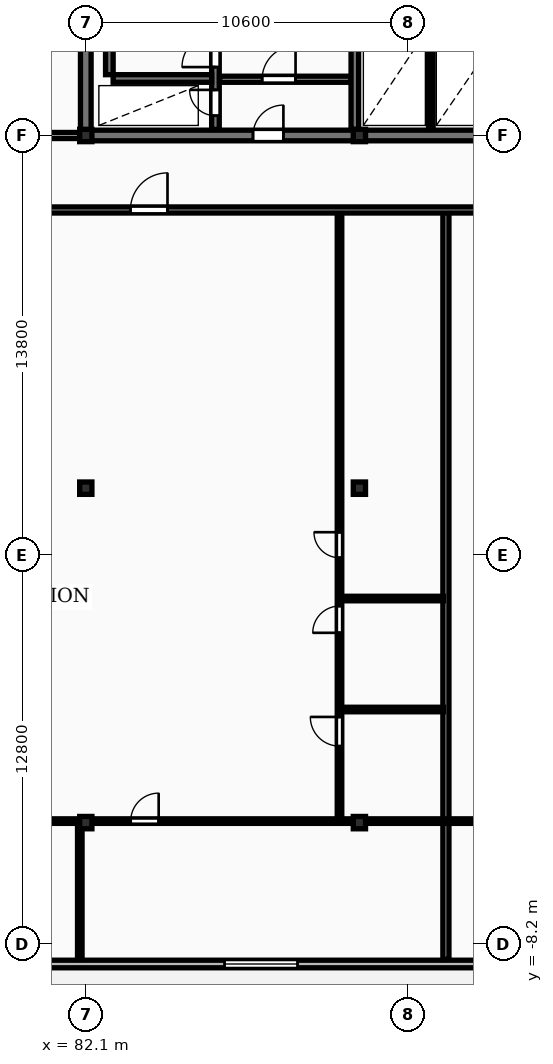
"""IFC4 building model, lengths in metres.
Left out: names, types, materials, properties, quantities, classifications, styles, units other than length and angle.
Written with IfcOpenShell. Run it as: python <this file> out.ifc"""

import sys

from ifc_helpers import new_model, si_unit, direction, frame, frame_2d, origin, origin_2d, place, context, subcontext, project, spatial, rectangle, i_section, extrude, element, fill, save


model = new_model("IFC4")
c1 = context("Model", 3, precision=1e-05, world=origin(), true_north=direction((0.0, 1.0)))
c2 = subcontext(c1, "Body", "Model", "MODEL_VIEW")
j1 = project(units=[si_unit("LENGTHUNIT", "METRE"), si_unit("PLANEANGLEUNIT", "RADIAN")], contexts=[c1])
p1 = place(None, origin())
s1 = spatial("IfcSite", under=j1, at=p1, CompositionType="ELEMENT")
p2 = place(p1, origin())
s2 = spatial("IfcBuilding", under=s1, at=p2, CompositionType="ELEMENT")
p3 = place(p2, frame((0.0, 0.0, 150.1)))
s3 = spatial("IfcBuildingStorey", under=s2, at=p3, CompositionType="ELEMENT", Elevation=150.1)
for number, where, z_axis, x_axis in (
    (1, (82.1, -4.2, 0.0), (0.0, 0.0, 1.0), (1.0, 0.0, 0.0)),
    (2, (82.1, 6.8, 0.0), (0.0, 0.0, 1.0), (1.0, 0.0, 0.0)),
    (3, (82.1, 18.4, 0.0), (0.0, 0.0, 1.0), (1.0, 0.0, 0.0)),
    (4, (91.1, -4.2, 0.0), (0.0, 0.0, 1.0), (1.0, 0.0, 0.0)),
    (5, (91.1, 6.8, 0.0), (0.0, 0.0, 1.0), (1.0, 0.0, 0.0)),
    (6, (91.1, 18.4, 0.0), (0.0, 0.0, 1.0), (1.0, 0.0, 0.0)),
):
    element("IfcColumn", number, at=place(p3, frame(where, z_axis=z_axis, x_axis=x_axis)), inside=s3, PredefinedType="COLUMN", context=c2, shape_type="SweptSolid", body=[
        extrude(i_section(OverallWidth=0.403, OverallDepth=0.406, WebThickness=0.027, FlangeThickness=0.043, FilletRadius=0.015, at=origin_2d()), origin(), (0.0, 0.0, 1.0), 3.6),
    ])
p4 = place(p3, frame((72.7, -8.85, 0.0), z_axis=(0.0, 0.0, 1.0), x_axis=(1.0, 0.0, 0.0)))
e7 = element("IfcWall", 7, at=p4, inside=s3, PredefinedType="STANDARD", context=c2, shape_type="SweptSolid", body=[
    extrude(rectangle(XDim=58.0, YDim=0.25, at=frame_2d((29.0, 0.0))), origin(), (0.0, 0.0, 1.0), 3.31),
])
p5 = place(p4, frame((3.761, 0.0, 0.0)))
e8 = element("IfcOpeningElement", 8, at=p5, cuts=e7, PredefinedType="OPENING", context=c2, shape_type="SweptSolid", body=[
    extrude(rectangle(XDim=1.8, YDim=2.2, at=frame_2d((0.9, 1.1))), frame((0.0, 0.135, 0.0), z_axis=(0.0, -1.0, 0.0), x_axis=(1.0, 0.0, 0.0)), (0.0, 0.0, 1.0), 0.27),
])
p6 = place(p4, frame((13.964, 0.0, 0.85)))
e9 = element("IfcOpeningElement", 9, at=p6, cuts=e7, PredefinedType="OPENING", context=c2, shape_type="SweptSolid", body=[
    extrude(rectangle(XDim=2.4, YDim=1.9, at=frame_2d((1.2, 0.95))), frame((0.0, 0.135, 0.0), z_axis=(0.0, -1.0, 0.0), x_axis=(1.0, 0.0, 0.0)), (0.0, 0.0, 1.0), 0.27),
])
p7 = place(p4, frame((25.138, 0.0, 0.0)))
e10 = element("IfcOpeningElement", 10, at=p7, cuts=e7, PredefinedType="OPENING", context=c2, shape_type="SweptSolid", body=[
    extrude(rectangle(XDim=1.8, YDim=2.2, at=frame_2d((0.9, 1.1))), frame((0.0, 0.135, 0.0), z_axis=(0.0, -1.0, 0.0), x_axis=(1.0, 0.0, 0.0)), (0.0, 0.0, 1.0), 0.27),
])
p8 = place(p4, frame((35.489, 0.0, 0.85)))
e11 = element("IfcOpeningElement", 11, at=p8, cuts=e7, PredefinedType="OPENING", context=c2, shape_type="SweptSolid", body=[
    extrude(rectangle(XDim=2.4, YDim=1.9, at=frame_2d((1.2, 0.95))), frame((0.0, 0.135, 0.0), z_axis=(0.0, -1.0, 0.0), x_axis=(1.0, 0.0, 0.0)), (0.0, 0.0, 1.0), 0.27),
])
p9 = place(p4, frame((47.713, 0.0, 0.0)))
e12 = element("IfcOpeningElement", 12, at=p9, cuts=e7, PredefinedType="OPENING", context=c2, shape_type="SweptSolid", body=[
    extrude(rectangle(XDim=1.8, YDim=2.2, at=frame_2d((0.9, 1.1))), frame((0.0, 0.135, 0.0), z_axis=(0.0, -1.0, 0.0), x_axis=(1.0, 0.0, 0.0)), (0.0, 0.0, 1.0), 0.27),
])
p10 = place(p4, frame((54.9, 0.0, 0.85)))
e13 = element("IfcOpeningElement", 13, at=p10, cuts=e7, PredefinedType="OPENING", context=c2, shape_type="SweptSolid", body=[
    extrude(rectangle(XDim=2.4, YDim=1.9, at=frame_2d((1.2, 0.95))), frame((0.0, 0.135, 0.0), z_axis=(0.0, -1.0, 0.0), x_axis=(1.0, 0.0, 0.0)), (0.0, 0.0, 1.0), 0.27),
])
p11 = place(p3, frame((82.1, 18.575, 0.0), z_axis=(0.0, 0.0, 1.0), x_axis=(0.0, 1.0, 0.0)))
e14 = element("IfcWall", 14, at=p11, inside=s3, PredefinedType="SHEAR", context=c2, shape_type="SweptSolid", body=[
    extrude(rectangle(XDim=11.65, YDim=0.35, at=frame_2d((5.825, 0.0))), origin(), (0.0, 0.0, 1.0), 3.6),
])
p12 = place(p3, frame((81.925, 18.4, 0.0), z_axis=(0.0, 0.0, 1.0), x_axis=(1.0, 0.0, 0.0)))
e15 = element("IfcWall", 15, at=p12, inside=s3, PredefinedType="SHEAR", context=c2, shape_type="SweptSolid", body=[
    extrude(rectangle(XDim=36.265, YDim=0.35, at=frame_2d((18.132, 0.0))), origin(), (0.0, 0.0, 1.0), 3.6),
])
p13 = place(p12, frame((5.675, 0.0, 0.0)))
e16 = element("IfcOpeningElement", 16, at=p13, cuts=e15, PredefinedType="OPENING", context=c2, shape_type="SweptSolid", body=[
    extrude(rectangle(XDim=1.0, YDim=2.15, at=frame_2d((0.5, 1.075))), frame((0.0, 0.185, 0.0), z_axis=(0.0, -1.0, 0.0), x_axis=(1.0, 0.0, 0.0)), (0.0, 0.0, 1.0), 0.37),
])
p14 = place(p12, frame((21.925, 0.0, 0.0)))
e17 = element("IfcOpeningElement", 17, at=p14, cuts=e15, PredefinedType="OPENING", context=c2, shape_type="SweptSolid", body=[
    extrude(rectangle(XDim=1.5, YDim=2.2, at=frame_2d((0.75, 1.1))), frame((0.0, 0.185, 0.0), z_axis=(0.0, -1.0, 0.0), x_axis=(1.0, 0.0, 0.0)), (0.0, 0.0, 1.0), 0.37),
])
p15 = place(p12, frame((29.875, 0.0, 0.0)))
e18 = element("IfcOpeningElement", 18, at=p15, cuts=e15, PredefinedType="OPENING", context=c2, shape_type="SweptSolid", body=[
    extrude(rectangle(XDim=1.0, YDim=2.15, at=frame_2d((0.5, 1.075))), frame((0.0, 0.185, 0.0), z_axis=(0.0, -1.0, 0.0), x_axis=(1.0, 0.0, 0.0)), (0.0, 0.0, 1.0), 0.37),
])
p16 = place(p3, frame((82.875, 20.4, 0.0), z_axis=(0.0, 0.0, 1.0), x_axis=(0.0, 1.0, 0.0)))
e19 = element("IfcWall", 19, at=p16, inside=s3, PredefinedType="SHEAR", context=c2, shape_type="SweptSolid", body=[
    extrude(rectangle(XDim=7.6, YDim=0.25, at=frame_2d((3.8, 0.0))), origin(), (0.0, 0.0, 1.0), 3.6),
])
p17 = place(p3, frame((86.365, 18.6, 0.0), z_axis=(0.0, 0.0, 1.0), x_axis=(0.0, 1.0, 0.0)))
e20 = element("IfcWall", 20, at=p17, inside=s3, PredefinedType="SHEAR", context=c2, shape_type="SweptSolid", body=[
    extrude(rectangle(XDim=11.6, YDim=0.25, at=frame_2d((5.8, 0.0))), origin(), (0.0, 0.0, 1.0), 3.6),
])
p18 = place(p17, frame((0.45, 0.0, 0.0)))
e21 = element("IfcOpeningElement", 21, at=p18, cuts=e20, PredefinedType="OPENING", context=c2, shape_type="SweptSolid", body=[
    extrude(rectangle(XDim=0.85, YDim=2.05, at=frame_2d((0.425, 1.025))), frame((0.0, 0.135, 0.0), z_axis=(0.0, -1.0, 0.0), x_axis=(1.0, 0.0, 0.0)), (0.0, 0.0, 1.0), 0.27),
])
p19 = place(p17, frame((2.05, 0.0, 0.0)))
e22 = element("IfcOpeningElement", 22, at=p19, cuts=e20, PredefinedType="OPENING", context=c2, shape_type="SweptSolid", body=[
    extrude(rectangle(XDim=1.1, YDim=2.1, at=frame_2d((0.55, 1.05))), frame((0.0, 0.135, 0.0), z_axis=(0.0, -1.0, 0.0), x_axis=(1.0, 0.0, 0.0)), (0.0, 0.0, 1.0), 0.27),
])
p20 = place(p17, frame((9.95, 0.0, 0.0)))
e23 = element("IfcOpeningElement", 23, at=p20, cuts=e20, PredefinedType="OPENING", context=c2, shape_type="SweptSolid", body=[
    extrude(rectangle(XDim=0.85, YDim=2.05, at=frame_2d((0.425, 1.025))), frame((0.0, 0.135, 0.0), z_axis=(0.0, -1.0, 0.0), x_axis=(1.0, 0.0, 0.0)), (0.0, 0.0, 1.0), 0.27),
])
p21 = place(p3, frame((83.0, 20.275, 0.0), z_axis=(0.0, 0.0, 1.0), x_axis=(1.0, 0.0, 0.0)))
e24 = element("IfcWall", 24, at=p21, inside=s3, PredefinedType="SHEAR", context=c2, shape_type="SweptSolid", body=[
    extrude(rectangle(XDim=3.24, YDim=0.25, at=frame_2d((1.62, 0.0))), origin(), (0.0, 0.0, 1.0), 3.6),
])
p22 = place(p3, frame((86.5, 20.25, 0.0), z_axis=(0.0, 0.0, 1.0), x_axis=(1.0, 0.0, 0.0)))
e25 = element("IfcWall", 25, at=p22, inside=s3, PredefinedType="PARTITIONING", context=c2, shape_type="SweptSolid", body=[
    extrude(rectangle(XDim=4.32, YDim=0.2, at=frame_2d((2.16, 0.0))), origin(), (0.0, 0.0, 1.0), 3.31),
])
p23 = place(p22, frame((1.4, 0.0, 0.0)))
e26 = element("IfcOpeningElement", 26, at=p23, cuts=e25, PredefinedType="OPENING", context=c2, shape_type="SweptSolid", body=[
    extrude(rectangle(XDim=1.1, YDim=2.1, at=frame_2d((0.55, 1.05))), frame((0.0, 0.11, 0.0), z_axis=(0.0, -1.0, 0.0), x_axis=(1.0, 0.0, 0.0)), (0.0, 0.0, 1.0), 0.22),
])
p24 = place(p3, frame((90.95, 18.6, 0.0), z_axis=(0.0, 0.0, 1.0), x_axis=(0.0, 1.0, 0.0)))
e27 = element("IfcWall", 27, at=p24, inside=s3, PredefinedType="SHEAR", context=c2, shape_type="SweptSolid", body=[
    extrude(rectangle(XDim=11.6, YDim=0.25, at=frame_2d((5.8, 0.0))), origin(), (0.0, 0.0, 1.0), 3.6),
])
p25 = place(p24, frame((4.6, 0.0, 0.0)))
e28 = element("IfcOpeningElement", 28, at=p25, cuts=e27, PredefinedType="OPENING", context=c2, shape_type="SweptSolid", body=[
    extrude(rectangle(XDim=1.1, YDim=2.1, at=frame_2d((0.55, 1.05))), frame((0.0, 0.135, 0.0), z_axis=(0.0, -1.0, 0.0), x_axis=(1.0, 0.0, 0.0)), (0.0, 0.0, 1.0), 0.27),
])
p26 = place(p3, frame((93.45, 18.6, 0.0), z_axis=(0.0, 0.0, 1.0), x_axis=(0.0, 1.0, 0.0)))
e29 = element("IfcWall", 29, at=p26, inside=s3, PredefinedType="PARTITIONING", context=c2, shape_type="SweptSolid", body=[
    extrude(rectangle(XDim=3.6, YDim=0.15, at=frame_2d((1.8, 0.0))), origin(), (0.0, 0.0, 1.0), 3.31),
])
p27 = place(p3, frame((72.7, 18.4, 0.0), z_axis=(0.0, 0.0, 1.0), x_axis=(1.0, 0.0, 0.0)))
e30 = element("IfcWall", 30, at=p27, inside=s3, PredefinedType="PARTITIONING", context=c2, shape_type="SweptSolid", body=[
    extrude(rectangle(XDim=9.25, YDim=0.2, at=frame_2d((4.625, 0.0))), origin(), (0.0, 0.0, 1.0), 2.698),
])
p28 = place(p27, frame((4.15, 0.0, 0.0)))
e31 = element("IfcOpeningElement", 31, at=p28, cuts=e30, PredefinedType="OPENING", context=c2, shape_type="SweptSolid", body=[
    extrude(rectangle(XDim=0.95, YDim=2.15, at=frame_2d((0.475, 1.075))), frame((0.0, 0.11, 0.0), z_axis=(0.0, -1.0, 0.0), x_axis=(1.0, 0.0, 0.0)), (0.0, 0.0, 1.0), 0.22),
])
p29 = place(p3, frame((93.946, -8.7, 0.0), z_axis=(0.0, 0.0, 1.0), x_axis=(0.0, 1.0, 0.0)))
e32 = element("IfcWall", 32, at=p29, inside=s3, PredefinedType="PARTITIONING", context=c2, shape_type="SweptSolid", body=[
    extrude(rectangle(XDim=24.57, YDim=0.2, at=frame_2d((12.285, 0.0))), origin(), (0.0, 0.0, 1.0), 3.31),
])
for number, where, z_axis, x_axis in (
    (33, (90.506, -0.48, 0.0), (0.0, 0.0, 1.0), (1.0, 0.0, 0.0)),
    (34, (90.506, 3.17, 0.0), (0.0, 0.0, 1.0), (1.0, 0.0, 0.0)),
):
    element("IfcWall", number, at=place(p3, frame(where, z_axis=z_axis, x_axis=x_axis)), inside=s3, PredefinedType="PARTITIONING", context=c2, shape_type="SweptSolid", body=[
        extrude(rectangle(XDim=3.36, YDim=0.15, at=frame_2d((1.68, 0.0))), origin(), (0.0, 0.0, 1.0), 3.31),
    ])
p30 = place(p3, frame((90.446, -4.09, 0.0), z_axis=(0.0, 0.0, 1.0), x_axis=(0.0, 1.0, 0.0)))
e35 = element("IfcWall", 35, at=p30, inside=s3, PredefinedType="PARTITIONING", context=c2, shape_type="SweptSolid", body=[
    extrude(rectangle(XDim=19.98, YDim=0.15, at=frame_2d((9.99, 0.0))), origin(), (0.0, 0.0, 1.0), 3.31),
])
p31 = place(p30, frame((2.406, 0.0, 0.0)))
e36 = element("IfcOpeningElement", 36, at=p31, cuts=e35, PredefinedType="OPENING", context=c2, shape_type="SweptSolid", body=[
    extrude(rectangle(XDim=0.96, YDim=2.1, at=frame_2d((0.48, 1.05))), frame((0.0, 0.085, 0.0), z_axis=(0.0, -1.0, 0.0), x_axis=(1.0, 0.0, 0.0)), (0.0, 0.0, 1.0), 0.17),
])
p32 = place(p30, frame((6.133, 0.0, 0.0)))
e37 = element("IfcOpeningElement", 37, at=p32, cuts=e35, PredefinedType="OPENING", context=c2, shape_type="SweptSolid", body=[
    extrude(rectangle(XDim=0.88, YDim=2.06, at=frame_2d((0.44, 1.03))), frame((0.0, 0.085, 0.0), z_axis=(0.0, -1.0, 0.0), x_axis=(1.0, 0.0, 0.0)), (0.0, 0.0, 1.0), 0.17),
])
p33 = place(p30, frame((8.602, 0.0, 0.0)))
e38 = element("IfcOpeningElement", 38, at=p33, cuts=e35, PredefinedType="OPENING", context=c2, shape_type="SweptSolid", body=[
    extrude(rectangle(XDim=0.84, YDim=2.04, at=frame_2d((0.42, 1.02))), frame((0.0, 0.085, 0.0), z_axis=(0.0, -1.0, 0.0), x_axis=(1.0, 0.0, 0.0)), (0.0, 0.0, 1.0), 0.17),
])
p34 = place(p3, frame((81.903, -8.7, 0.0), z_axis=(0.0, 0.0, 1.0), x_axis=(0.0, 1.0, 0.0)))
e39 = element("IfcWall", 39, at=p34, inside=s3, PredefinedType="PARTITIONING", context=c2, shape_type="SweptSolid", body=[
    extrude(rectangle(XDim=4.47, YDim=0.15, at=frame_2d((2.235, 0.0))), origin(), (0.0, 0.0, 1.0), 3.31),
])
p35 = place(p3, frame((72.78, -4.15, 0.0), z_axis=(0.0, 0.0, 1.0), x_axis=(1.0, 0.0, 0.0)))
e40 = element("IfcWall", 40, at=p35, inside=s3, PredefinedType="PARTITIONING", context=c2, shape_type="SweptSolid", body=[
    extrude(rectangle(XDim=21.085, YDim=0.15, at=frame_2d((10.543, 0.0))), origin(), (0.0, 0.0, 1.0), 3.003),
])
p36 = place(p35, frame((6.874, 0.0, 0.0)))
e41 = element("IfcOpeningElement", 41, at=p36, cuts=e40, PredefinedType="OPENING", context=c2, shape_type="SweptSolid", body=[
    extrude(rectangle(XDim=0.92, YDim=2.08, at=frame_2d((0.46, 1.04))), frame((0.0, 0.085, 0.0), z_axis=(0.0, -1.0, 0.0), x_axis=(1.0, 0.0, 0.0)), (0.0, 0.0, 1.0), 0.17),
])
p37 = place(p35, frame((10.797, 0.0, 0.0)))
e42 = element("IfcOpeningElement", 42, at=p37, cuts=e40, PredefinedType="OPENING", context=c2, shape_type="SweptSolid", body=[
    extrude(rectangle(XDim=0.92, YDim=2.08, at=frame_2d((0.46, 1.04))), frame((0.0, 0.085, 0.0), z_axis=(0.0, -1.0, 0.0), x_axis=(1.0, 0.0, 0.0)), (0.0, 0.0, 1.0), 0.17),
])
p38 = place(p3, frame((94.025, -4.15, 0.0), z_axis=(0.0, 0.0, 1.0), x_axis=(1.0, 0.0, 0.0)))
e43 = element("IfcWall", 43, at=p38, inside=s3, PredefinedType="PARTITIONING", context=c2, shape_type="SweptSolid", body=[
    extrude(rectangle(XDim=21.381, YDim=0.15, at=frame_2d((10.69, 0.0))), origin(), (0.0, 0.0, 1.0), 3.003),
])
p39 = place(p38, frame((8.195, 0.0, 0.0)))
e44 = element("IfcOpeningElement", 44, at=p39, cuts=e43, PredefinedType="OPENING", context=c2, shape_type="SweptSolid", body=[
    extrude(rectangle(XDim=0.94, YDim=2.1, at=frame_2d((0.47, 1.05))), frame((0.0, 0.085, 0.0), z_axis=(0.0, -1.0, 0.0), x_axis=(1.0, 0.0, 0.0)), (0.0, 0.0, 1.0), 0.17),
])
p40 = place(p38, frame((10.22, 0.0, 0.0)))
e45 = element("IfcOpeningElement", 45, at=p40, cuts=e43, PredefinedType="OPENING", context=c2, shape_type="SweptSolid", body=[
    extrude(rectangle(XDim=0.94, YDim=2.1, at=frame_2d((0.47, 1.05))), frame((0.0, 0.085, 0.0), z_axis=(0.0, -1.0, 0.0), x_axis=(1.0, 0.0, 0.0)), (0.0, 0.0, 1.0), 0.17),
])
p41 = place(p3, frame((72.7, 15.95, 0.0), z_axis=(0.0, 0.0, 1.0), x_axis=(1.0, 0.0, 0.0)))
e46 = element("IfcWall", 46, at=p41, inside=s3, PredefinedType="PARTITIONING", context=c2, shape_type="SweptSolid", body=[
    extrude(rectangle(XDim=58.0, YDim=0.2, at=frame_2d((29.0, 0.0))), origin(), (0.0, 0.0, 1.0), 3.31),
])
p42 = place(p41, frame((10.868, 0.0, 0.0)))
e47 = element("IfcOpeningElement", 47, at=p42, cuts=e46, PredefinedType="OPENING", context=c2, shape_type="SweptSolid", body=[
    extrude(rectangle(XDim=1.22, YDim=2.18, at=frame_2d((0.61, 1.09))), frame((0.0, 0.11, 0.0), z_axis=(0.0, -1.0, 0.0), x_axis=(1.0, 0.0, 0.0)), (0.0, 0.0, 1.0), 0.22),
])
p43 = place(p41, frame((30.441, 0.0, 0.0)))
e48 = element("IfcOpeningElement", 48, at=p43, cuts=e46, PredefinedType="OPENING", context=c2, shape_type="SweptSolid", body=[
    extrude(rectangle(XDim=1.22, YDim=2.18, at=frame_2d((0.61, 1.09))), frame((0.0, 0.11, 0.0), z_axis=(0.0, -1.0, 0.0), x_axis=(1.0, 0.0, 0.0)), (0.0, 0.0, 1.0), 0.22),
])
p44 = place(p41, frame((44.831, 0.0, 0.0)))
e49 = element("IfcOpeningElement", 49, at=p44, cuts=e46, PredefinedType="OPENING", context=c2, shape_type="SweptSolid", body=[
    extrude(rectangle(XDim=0.95, YDim=2.15, at=frame_2d((0.475, 1.075))), frame((0.0, 0.11, 0.0), z_axis=(0.0, -1.0, 0.0), x_axis=(1.0, 0.0, 0.0)), (0.0, 0.0, 1.0), 0.22),
])
p45 = place(p6, origin())
e50 = element("IfcWindow", 50, at=p45, inside=s3, PartitioningType="DOUBLE_PANEL_VERTICAL", PredefinedType="WINDOW", context=c2, shape_type="SweptSolid", body=[
    extrude(rectangle(XDim=2.4, YDim=1.9, at=frame_2d((1.2, 0.95))), frame((0.0, 0.03, 0.0), z_axis=(0.0, -1.0, 0.0), x_axis=(1.0, 0.0, 0.0)), (0.0, 0.0, 1.0), 0.06),
])
fill(e9, e50)
p46 = place(p13, origin())
e51 = element("IfcDoor", 51, at=p46, inside=s3, OperationType="SINGLE_SWING_RIGHT", PredefinedType="DOOR", context=c2, shape_type="SweptSolid", body=[
    extrude(rectangle(XDim=1.0, YDim=2.15, at=frame_2d((0.5, 1.075))), frame((0.0, 0.025, 0.0), z_axis=(0.0, -1.0, 0.0), x_axis=(1.0, 0.0, 0.0)), (0.0, 0.0, 1.0), 0.05),
])
fill(e16, e51)
p47 = place(p18, origin())
e52 = element("IfcDoor", 52, at=p47, inside=s3, OperationType="SINGLE_SWING_RIGHT", PredefinedType="DOOR", context=c2, shape_type="SweptSolid", body=[
    extrude(rectangle(XDim=0.85, YDim=2.05, at=frame_2d((0.425, 1.025))), frame((0.0, 0.025, 0.0), z_axis=(0.0, -1.0, 0.0), x_axis=(1.0, 0.0, 0.0)), (0.0, 0.0, 1.0), 0.05),
])
fill(e21, e52)
p48 = place(p19, origin())
e53 = element("IfcDoor", 53, at=p48, inside=s3, OperationType="SINGLE_SWING_LEFT", PredefinedType="DOOR", context=c2, shape_type="SweptSolid", body=[
    extrude(rectangle(XDim=1.1, YDim=2.1, at=frame_2d((0.55, 1.05))), frame((0.0, 0.025, 0.0), z_axis=(0.0, -1.0, 0.0), x_axis=(1.0, 0.0, 0.0)), (0.0, 0.0, 1.0), 0.05),
])
fill(e22, e53)
p49 = place(p23, origin())
e54 = element("IfcDoor", 54, at=p49, inside=s3, OperationType="SINGLE_SWING_RIGHT", PredefinedType="DOOR", context=c2, shape_type="SweptSolid", body=[
    extrude(rectangle(XDim=1.1, YDim=2.1, at=frame_2d((0.55, 1.05))), frame((0.0, 0.025, 0.0), z_axis=(0.0, -1.0, 0.0), x_axis=(1.0, 0.0, 0.0)), (0.0, 0.0, 1.0), 0.05),
])
fill(e26, e54)
p50 = place(p31, origin())
e55 = element("IfcDoor", 55, at=p50, inside=s3, OperationType="SINGLE_SWING_RIGHT", PredefinedType="DOOR", context=c2, shape_type="SweptSolid", body=[
    extrude(rectangle(XDim=0.96, YDim=2.1, at=frame_2d((0.48, 1.05))), frame((0.0, 0.025, 0.0), z_axis=(0.0, -1.0, 0.0), x_axis=(1.0, 0.0, 0.0)), (0.0, 0.0, 1.0), 0.05),
])
fill(e36, e55)
p51 = place(p32, origin())
e56 = element("IfcDoor", 56, at=p51, inside=s3, OperationType="SINGLE_SWING_LEFT", PredefinedType="DOOR", context=c2, shape_type="SweptSolid", body=[
    extrude(rectangle(XDim=0.88, YDim=2.06, at=frame_2d((0.44, 1.03))), frame((0.0, 0.025, 0.0), z_axis=(0.0, -1.0, 0.0), x_axis=(1.0, 0.0, 0.0)), (0.0, 0.0, 1.0), 0.05),
])
fill(e37, e56)
p52 = place(p33, origin())
e57 = element("IfcDoor", 57, at=p52, inside=s3, OperationType="SINGLE_SWING_RIGHT", PredefinedType="DOOR", context=c2, shape_type="SweptSolid", body=[
    extrude(rectangle(XDim=0.84, YDim=2.04, at=frame_2d((0.42, 1.02))), frame((0.0, 0.025, 0.0), z_axis=(0.0, -1.0, 0.0), x_axis=(1.0, 0.0, 0.0)), (0.0, 0.0, 1.0), 0.05),
])
fill(e38, e57)
p53 = place(p37, origin())
e58 = element("IfcDoor", 58, at=p53, inside=s3, OperationType="SINGLE_SWING_RIGHT", PredefinedType="DOOR", context=c2, shape_type="SweptSolid", body=[
    extrude(rectangle(XDim=0.92, YDim=2.08, at=frame_2d((0.46, 1.04))), frame((0.0, 0.025, 0.0), z_axis=(0.0, -1.0, 0.0), x_axis=(1.0, 0.0, 0.0)), (0.0, 0.0, 1.0), 0.05),
])
fill(e42, e58)
p54 = place(p42, origin())
e59 = element("IfcDoor", 59, at=p54, inside=s3, OperationType="SINGLE_SWING_RIGHT", PredefinedType="DOOR", context=c2, shape_type="SweptSolid", body=[
    extrude(rectangle(XDim=1.22, YDim=2.18, at=frame_2d((0.61, 1.09))), frame((0.0, 0.025, 0.0), z_axis=(0.0, -1.0, 0.0), x_axis=(1.0, 0.0, 0.0)), (0.0, 0.0, 1.0), 0.05),
])
fill(e47, e59)
save(model, sys.argv[1])
